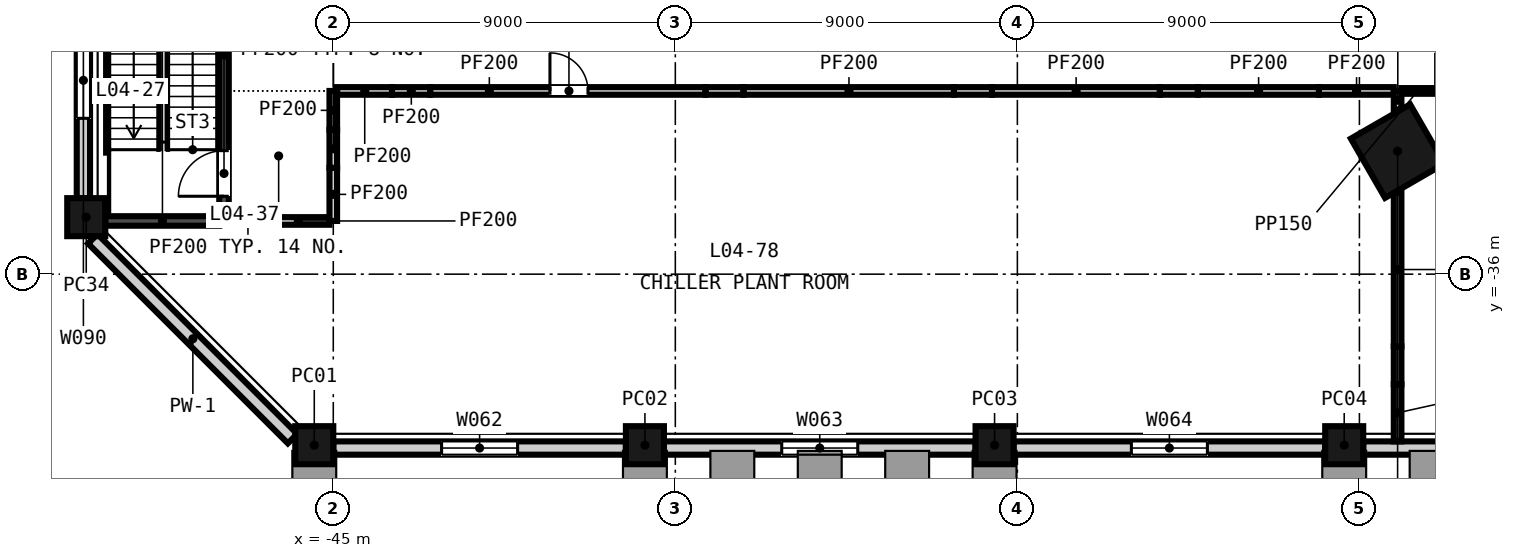
"""IFC4 building model, lengths in metres.
Left out: names, types, materials, properties, quantities, classifications, styles, units other than length and angle.
Written with IfcOpenShell. Run it as: python <this file> out.ifc"""

import sys

from ifc_helpers import new_model, si_unit, direction, frame, frame_2d, origin, origin_2d, place, context, subcontext, project, spatial, rectangle, extrude, element, fill, save


model = new_model("IFC4")
c1 = context("Model", 3, precision=1e-05, world=origin(), true_north=direction((0.0, 1.0)))
c2 = subcontext(c1, "Body", "Model", "MODEL_VIEW")
j1 = project(units=[si_unit("LENGTHUNIT", "METRE"), si_unit("PLANEANGLEUNIT", "RADIAN")], contexts=[c1])
p1 = place(None, origin())
s1 = spatial("IfcSite", under=j1, at=p1, CompositionType="ELEMENT")
p2 = place(p1, origin())
s2 = spatial("IfcBuilding", under=s1, at=p2, CompositionType="ELEMENT")
p3 = place(p2, frame((0.0, 0.0, 27.0)))
s3 = spatial("IfcBuildingStorey", under=s2, at=p3, CompositionType="ELEMENT", Elevation=27.0)
p4 = place(p3, frame((-16.995, -32.763, -0.3), z_axis=(0.0, 0.0, 1.0), x_axis=(0.5, -0.866025403784, 0.0)))
e1 = element("IfcColumn", 1, at=p4, inside=s3, PredefinedType="COLUMN", context=c2, shape_type="SweptSolid", body=[
    extrude(rectangle(XDim=1.8, YDim=1.8, at=origin_2d()), origin(), (0.0, 0.0, 1.0), 4.5),
])
for number, where, z_axis, x_axis in (
    (2, (-45.5, -40.5, -0.3), (0.0, 0.0, 1.0), (1.0, 0.0, 0.0)),
    (3, (-36.8, -40.5, -0.3), (0.0, 0.0, 1.0), (1.0, 0.0, 0.0)),
    (4, (-27.6, -40.5, -0.3), (0.0, 0.0, 1.0), (1.0, 0.0, 0.0)),
    (5, (-18.4, -40.5, -0.3), (0.0, 0.0, 1.0), (1.0, 0.0, 0.0)),
    (6, (-51.5, -34.5, -0.3), (0.0, 0.0, 1.0), (0.0, -1.0, 0.0)),
):
    element("IfcColumn", number, at=place(p3, frame(where, z_axis=z_axis, x_axis=x_axis)), inside=s3, PredefinedType="COLUMN", context=c2, shape_type="SweptSolid", body=[
        extrude(rectangle(XDim=1.0, YDim=1.0, at=origin_2d()), origin(), (0.0, 0.0, 1.0), 4.5),
    ])
p5 = place(p3, frame((-45.0, -40.575, -0.3), z_axis=(0.0, 0.0, 1.0), x_axis=(1.0, 0.0, 0.0)))
e7 = element("IfcWall", 7, at=p5, inside=s3, PredefinedType="SOLIDWALL", context=c2, shape_type="SweptSolid", body=[
    extrude(rectangle(XDim=7.7, YDim=0.35, at=frame_2d((3.85, 0.0))), origin(), (0.0, 0.0, 1.0), 3.6),
])
p6 = place(p5, frame((2.85, 0.0, 1.2)))
e8 = element("IfcOpeningElement", 8, at=p6, cuts=e7, PredefinedType="OPENING", context=c2, shape_type="SweptSolid", body=[
    extrude(rectangle(XDim=2.0, YDim=2.35, at=frame_2d((1.0, 1.175))), frame((0.0, 0.185, 0.0), z_axis=(0.0, -1.0, 0.0), x_axis=(1.0, 0.0, 0.0)), (0.0, 0.0, 1.0), 0.37),
])
p7 = place(p3, frame((-36.3, -40.575, -0.3), z_axis=(0.0, 0.0, 1.0), x_axis=(1.0, 0.0, 0.0)))
e9 = element("IfcWall", 9, at=p7, inside=s3, PredefinedType="SOLIDWALL", context=c2, shape_type="SweptSolid", body=[
    extrude(rectangle(XDim=8.2, YDim=0.35, at=frame_2d((4.1, 0.0))), origin(), (0.0, 0.0, 1.0), 3.6),
])
p8 = place(p7, frame((3.1, 0.0, 1.2)))
e10 = element("IfcOpeningElement", 10, at=p8, cuts=e9, PredefinedType="OPENING", context=c2, shape_type="SweptSolid", body=[
    extrude(rectangle(XDim=2.0, YDim=2.35, at=frame_2d((1.0, 1.175))), frame((0.0, 0.185, 0.0), z_axis=(0.0, -1.0, 0.0), x_axis=(1.0, 0.0, 0.0)), (0.0, 0.0, 1.0), 0.37),
])
p9 = place(p3, frame((-27.1, -40.575, -0.3), z_axis=(0.0, 0.0, 1.0), x_axis=(1.0, 0.0, 0.0)))
e11 = element("IfcWall", 11, at=p9, inside=s3, PredefinedType="SOLIDWALL", context=c2, shape_type="SweptSolid", body=[
    extrude(rectangle(XDim=8.2, YDim=0.35, at=frame_2d((4.1, 0.0))), origin(), (0.0, 0.0, 1.0), 3.6),
])
p10 = place(p9, frame((3.1, 0.0, 1.2)))
e12 = element("IfcOpeningElement", 12, at=p10, cuts=e11, PredefinedType="OPENING", context=c2, shape_type="SweptSolid", body=[
    extrude(rectangle(XDim=2.0, YDim=2.35, at=frame_2d((1.0, 1.175))), frame((0.0, 0.185, 0.0), z_axis=(0.0, -1.0, 0.0), x_axis=(1.0, 0.0, 0.0)), (0.0, 0.0, 1.0), 0.37),
])
p11 = place(p3, frame((-17.9, -40.575, -0.3), z_axis=(0.0, 0.0, 1.0), x_axis=(1.0, 0.0, 0.0)))
e13 = element("IfcWall", 13, at=p11, inside=s3, PredefinedType="SOLIDWALL", context=c2, shape_type="SweptSolid", body=[
    extrude(rectangle(XDim=8.2, YDim=0.35, at=frame_2d((4.1, 0.0))), origin(), (0.0, 0.0, 1.0), 3.6),
])
p12 = place(p11, frame((3.1, 0.0, 1.2)))
e14 = element("IfcOpeningElement", 14, at=p12, cuts=e13, PredefinedType="OPENING", context=c2, shape_type="SweptSolid", body=[
    extrude(rectangle(XDim=2.0, YDim=2.35, at=frame_2d((1.0, 1.175))), frame((0.0, 0.185, 0.0), z_axis=(0.0, -1.0, 0.0), x_axis=(1.0, 0.0, 0.0)), (0.0, 0.0, 1.0), 0.37),
])
p13 = place(p3, frame((-51.575, -27.8, -0.3), z_axis=(0.0, 0.0, 1.0), x_axis=(0.0, -1.0, 0.0)))
e15 = element("IfcWall", 15, at=p13, inside=s3, PredefinedType="SOLIDWALL", context=c2, shape_type="SweptSolid", body=[
    extrude(rectangle(XDim=6.2, YDim=0.35, at=frame_2d((3.1, 0.0))), origin(), (0.0, 0.0, 1.0), 3.6),
])
p14 = place(p13, frame((2.1, 0.0, 1.2)))
e16 = element("IfcOpeningElement", 16, at=p14, cuts=e15, PredefinedType="OPENING", context=c2, shape_type="SweptSolid", body=[
    extrude(rectangle(XDim=2.0, YDim=2.35, at=frame_2d((1.0, 1.175))), frame((0.0, 0.185, 0.0), z_axis=(0.0, -1.0, 0.0), x_axis=(1.0, 0.0, 0.0)), (0.0, 0.0, 1.0), 0.37),
])
p15 = place(p3, frame((-51.327, -35.072, -0.3), z_axis=(0.0, 0.0, 1.0), x_axis=(0.707106781187, -0.707106781187, 0.0)))
e17 = element("IfcWall", 17, at=p15, inside=s3, PredefinedType="SOLIDWALL", context=c2, shape_type="SweptSolid", body=[
    extrude(rectangle(XDim=7.433, YDim=0.35, at=frame_2d((3.716, 0.0))), origin(), (0.0, 0.0, 1.0), 3.6),
])
p16 = place(p3, frame((-51.0, -34.6, 0.0), z_axis=(0.0, 0.0, 1.0), x_axis=(1.0, 0.0, 0.0)))
e18 = element("IfcWall", 18, at=p16, inside=s3, PredefinedType="SHEAR", context=c2, shape_type="SweptSolid", body=[
    extrude(rectangle(XDim=3.0, YDim=0.25, at=frame_2d((1.5, 0.0))), origin(), (0.0, 0.0, 1.0), 4.2),
])
p17 = place(p3, frame((-47.75, -34.6, 0.0), z_axis=(0.0, 0.0, 1.0), x_axis=(1.0, 0.0, 0.0)))
e19 = element("IfcWall", 19, at=p17, inside=s3, PredefinedType="PARTITIONING", context=c2, shape_type="SweptSolid", body=[
    extrude(rectangle(XDim=1.0, YDim=0.2, at=frame_2d((0.5, 0.0))), origin(), (0.0, 0.0, 1.0), 3.111),
])
p18 = place(p3, frame((-46.75, -34.6, 0.0), z_axis=(0.0, 0.0, 1.0), x_axis=(1.0, 0.0, 0.0)))
e20 = element("IfcWall", 20, at=p18, inside=s3, PredefinedType="PARTITIONING", context=c2, shape_type="SweptSolid", body=[
    extrude(rectangle(XDim=1.65, YDim=0.2, at=frame_2d((0.825, 0.0))), origin(), (0.0, 0.0, 1.0), 4.2),
])
p19 = place(p3, frame((-44.9, -31.179, 0.0), z_axis=(0.0, 0.0, 1.0), x_axis=(1.0, 0.0, 0.0)))
e21 = element("IfcWall", 21, at=p19, inside=s3, PredefinedType="PARTITIONING", context=c2, shape_type="SweptSolid", body=[
    extrude(rectangle(XDim=1.445, YDim=0.2, at=frame_2d((0.723, 0.0))), origin(), (0.0, 0.0, 1.0), 4.2),
])
p20 = place(p3, frame((-43.455, -31.179, 0.0), z_axis=(0.0, 0.0, 1.0), x_axis=(1.0, 0.0, 0.0)))
e22 = element("IfcWall", 22, at=p20, inside=s3, PredefinedType="PARTITIONING", context=c2, shape_type="SweptSolid", body=[
    extrude(rectangle(XDim=1.006, YDim=0.2, at=frame_2d((0.503, 0.0))), origin(), (0.0, 0.0, 1.0), 3.111),
])
p21 = place(p3, frame((-42.449, -31.179, 0.0), z_axis=(0.0, 0.0, 1.0), x_axis=(1.0, 0.0, 0.0)))
e23 = element("IfcWall", 23, at=p21, inside=s3, PredefinedType="PARTITIONING", context=c2, shape_type="SweptSolid", body=[
    extrude(rectangle(XDim=7.245, YDim=0.2, at=frame_2d((3.623, 0.0))), origin(), (0.0, 0.0, 1.0), 4.2),
])
p22 = place(p21, frame((3.15, 0.0, 0.0)))
e24 = element("IfcOpeningElement", 24, at=p22, cuts=e23, PredefinedType="OPENING", context=c2, shape_type="SweptSolid", body=[
    extrude(rectangle(XDim=1.0, YDim=2.1, at=frame_2d((0.5, 1.05))), frame((0.0, 0.11, 0.0), z_axis=(0.0, -1.0, 0.0), x_axis=(1.0, 0.0, 0.0)), (0.0, 0.0, 1.0), 0.22),
])
p23 = place(p3, frame((-35.204, -31.179, 0.0), z_axis=(0.0, 0.0, 1.0), x_axis=(1.0, 0.0, 0.0)))
e25 = element("IfcWall", 25, at=p23, inside=s3, PredefinedType="PARTITIONING", context=c2, shape_type="SweptSolid", body=[
    extrude(rectangle(XDim=1.0, YDim=0.2, at=frame_2d((0.5, 0.0))), origin(), (0.0, 0.0, 1.0), 3.111),
])
p24 = place(p3, frame((-34.204, -31.179, 0.0), z_axis=(0.0, 0.0, 1.0), x_axis=(1.0, 0.0, 0.0)))
e26 = element("IfcWall", 26, at=p24, inside=s3, PredefinedType="PARTITIONING", context=c2, shape_type="SweptSolid", body=[
    extrude(rectangle(XDim=5.536, YDim=0.2, at=frame_2d((2.768, 0.0))), origin(), (0.0, 0.0, 1.0), 4.2),
])
p25 = place(p3, frame((-28.668, -31.179, 0.0), z_axis=(0.0, 0.0, 1.0), x_axis=(1.0, 0.0, 0.0)))
e27 = element("IfcWall", 27, at=p25, inside=s3, PredefinedType="PARTITIONING", context=c2, shape_type="SweptSolid", body=[
    extrude(rectangle(XDim=1.0, YDim=0.2, at=frame_2d((0.5, 0.0))), origin(), (0.0, 0.0, 1.0), 3.286),
])
p26 = place(p3, frame((-27.668, -31.179, 0.0), z_axis=(0.0, 0.0, 1.0), x_axis=(1.0, 0.0, 0.0)))
e28 = element("IfcWall", 28, at=p26, inside=s3, PredefinedType="PARTITIONING", context=c2, shape_type="SweptSolid", body=[
    extrude(rectangle(XDim=4.418, YDim=0.2, at=frame_2d((2.209, 0.0))), origin(), (0.0, 0.0, 1.0), 4.2),
])
p27 = place(p3, frame((-23.25, -31.179, 0.0), z_axis=(0.0, 0.0, 1.0), x_axis=(1.0, 0.0, 0.0)))
e29 = element("IfcWall", 29, at=p27, inside=s3, PredefinedType="PARTITIONING", context=c2, shape_type="SweptSolid", body=[
    extrude(rectangle(XDim=1.0, YDim=0.2, at=frame_2d((0.5, 0.0))), origin(), (0.0, 0.0, 1.0), 3.441),
])
p28 = place(p3, frame((-22.25, -31.179, 0.0), z_axis=(0.0, 0.0, 1.0), x_axis=(1.0, 0.0, 0.0)))
e30 = element("IfcWall", 30, at=p28, inside=s3, PredefinedType="PARTITIONING", context=c2, shape_type="SweptSolid", body=[
    extrude(rectangle(XDim=3.185, YDim=0.2, at=frame_2d((1.593, 0.0))), origin(), (0.0, 0.0, 1.0), 4.2),
])
p29 = place(p3, frame((-19.065, -31.179, 0.0), z_axis=(0.0, 0.0, 1.0), x_axis=(1.0, 0.0, 0.0)))
e31 = element("IfcWall", 31, at=p29, inside=s3, PredefinedType="PARTITIONING", context=c2, shape_type="SweptSolid", body=[
    extrude(rectangle(XDim=1.97, YDim=0.2, at=frame_2d((0.985, 0.0))), origin(), (0.0, 0.0, 1.0), 3.2),
])
p30 = place(p3, frame((-16.895, -31.179, 0.0), z_axis=(0.0, 0.0, 1.0), x_axis=(1.0, 0.0, 0.0)))
e32 = element("IfcWall", 32, at=p30, inside=s3, PredefinedType="PARTITIONING", context=c2, shape_type="SweptSolid", body=[
    extrude(rectangle(XDim=2.663, YDim=0.15, at=frame_2d((1.332, 0.0))), origin(), (0.0, 0.0, 1.0), 4.2),
])
p31 = place(p30, frame((0.9, 0.0, 0.0)))
e33 = element("IfcOpeningElement", 33, at=p31, cuts=e32, PredefinedType="OPENING", context=c2, shape_type="SweptSolid", body=[
    extrude(rectangle(XDim=1.0, YDim=2.1, at=frame_2d((0.5, 1.05))), frame((0.0, 0.085, 0.0), z_axis=(0.0, -1.0, 0.0), x_axis=(1.0, 0.0, 0.0)), (0.0, 0.0, 1.0), 0.17),
])
p32 = place(p3, frame((-47.875, -34.6, 0.0), z_axis=(0.0, 0.0, 1.0), x_axis=(0.0, 1.0, 0.0)))
e34 = element("IfcWall", 34, at=p32, inside=s3, PredefinedType="SHEAR", context=c2, shape_type="SweptSolid", body=[
    extrude(rectangle(XDim=6.821, YDim=0.25, at=frame_2d((3.411, 0.0))), origin(), (0.0, 0.0, 1.0), 4.2),
])
p33 = place(p32, frame((0.65, 0.0, 0.0)))
e35 = element("IfcOpeningElement", 35, at=p33, cuts=e34, PredefinedType="OPENING", context=c2, shape_type="SweptSolid", body=[
    extrude(rectangle(XDim=1.2, YDim=2.1, at=frame_2d((0.6, 1.05))), frame((0.0, 0.135, 0.0), z_axis=(0.0, -1.0, 0.0), x_axis=(1.0, 0.0, 0.0)), (0.0, 0.0, 1.0), 0.27),
])
p34 = place(p3, frame((-45.0, -34.6, 0.0), z_axis=(0.0, 0.0, 1.0), x_axis=(0.0, 1.0, 0.0)))
e36 = element("IfcWall", 36, at=p34, inside=s3, PredefinedType="PARTITIONING", context=c2, shape_type="SweptSolid", body=[
    extrude(rectangle(XDim=1.399, YDim=0.2, at=frame_2d((0.7, 0.0))), origin(), (0.0, 0.0, 1.0), 4.2),
])
p35 = place(p3, frame((-45.0, -33.201, 0.0), z_axis=(0.0, 0.0, 1.0), x_axis=(0.0, 1.0, 0.0)))
e37 = element("IfcWall", 37, at=p35, inside=s3, PredefinedType="PARTITIONING", context=c2, shape_type="SweptSolid", body=[
    extrude(rectangle(XDim=1.0, YDim=0.2, at=frame_2d((0.5, 0.0))), origin(), (0.0, 0.0, 1.0), 3.111),
])
p36 = place(p3, frame((-45.0, -32.201, 0.0), z_axis=(0.0, 0.0, 1.0), x_axis=(0.0, 1.0, 0.0)))
e38 = element("IfcWall", 38, at=p36, inside=s3, PredefinedType="PARTITIONING", context=c2, shape_type="SweptSolid", body=[
    extrude(rectangle(XDim=1.022, YDim=0.2, at=frame_2d((0.511, 0.0))), origin(), (0.0, 0.0, 1.0), 4.2),
])
p37 = place(p3, frame((-16.995, -40.4, 0.0), z_axis=(0.0, 0.0, 1.0), x_axis=(0.0, 1.0, 0.0)))
e39 = element("IfcWall", 39, at=p37, inside=s3, PredefinedType="PARTITIONING", context=c2, shape_type="SweptSolid", body=[
    extrude(rectangle(XDim=1.504, YDim=0.2, at=frame_2d((0.752, 0.0))), origin(), (0.0, 0.0, 1.0), 4.2),
])
p38 = place(p3, frame((-16.995, -38.896, 0.0), z_axis=(0.0, 0.0, 1.0), x_axis=(0.0, 1.0, 0.0)))
e40 = element("IfcWall", 40, at=p38, inside=s3, PredefinedType="PARTITIONING", context=c2, shape_type="SweptSolid", body=[
    extrude(rectangle(XDim=1.0, YDim=0.2, at=frame_2d((0.5, 0.0))), origin(), (0.0, 0.0, 1.0), 3.676),
])
p39 = place(p3, frame((-16.995, -37.896, 0.0), z_axis=(0.0, 0.0, 1.0), x_axis=(0.0, 1.0, 0.0)))
e41 = element("IfcWall", 41, at=p39, inside=s3, PredefinedType="PARTITIONING", context=c2, shape_type="SweptSolid", body=[
    extrude(rectangle(XDim=4.036, YDim=0.2, at=frame_2d((2.018, 0.0))), origin(), (0.0, 0.0, 1.0), 4.2),
])
p40 = place(p3, frame((-16.995, -31.666, 0.0), z_axis=(0.0, 0.0, 1.0), x_axis=(0.0, 1.0, 0.0)))
e42 = element("IfcWall", 42, at=p40, inside=s3, PredefinedType="PARTITIONING", context=c2, shape_type="SweptSolid", body=[
    extrude(rectangle(XDim=0.487, YDim=0.2, at=frame_2d((0.244, 0.0))), origin(), (0.0, 0.0, 1.0), 4.2),
])
p41 = place(p6, origin())
e43 = element("IfcWindow", 43, at=p41, inside=s3, PartitioningType="SINGLE_PANEL", PredefinedType="WINDOW", context=c2, shape_type="SweptSolid", body=[
    extrude(rectangle(XDim=2.0, YDim=2.35, at=frame_2d((1.0, 1.175))), frame((0.0, 0.03, 0.0), z_axis=(0.0, -1.0, 0.0), x_axis=(1.0, 0.0, 0.0)), (0.0, 0.0, 1.0), 0.06),
])
fill(e8, e43)
p42 = place(p8, origin())
e44 = element("IfcWindow", 44, at=p42, inside=s3, PartitioningType="SINGLE_PANEL", PredefinedType="WINDOW", context=c2, shape_type="SweptSolid", body=[
    extrude(rectangle(XDim=2.0, YDim=2.35, at=frame_2d((1.0, 1.175))), frame((0.0, 0.03, 0.0), z_axis=(0.0, -1.0, 0.0), x_axis=(1.0, 0.0, 0.0)), (0.0, 0.0, 1.0), 0.06),
])
fill(e10, e44)
p43 = place(p10, origin())
e45 = element("IfcWindow", 45, at=p43, inside=s3, PartitioningType="SINGLE_PANEL", PredefinedType="WINDOW", context=c2, shape_type="SweptSolid", body=[
    extrude(rectangle(XDim=2.0, YDim=2.35, at=frame_2d((1.0, 1.175))), frame((0.0, 0.03, 0.0), z_axis=(0.0, -1.0, 0.0), x_axis=(1.0, 0.0, 0.0)), (0.0, 0.0, 1.0), 0.06),
])
fill(e12, e45)
p44 = place(p14, origin())
e46 = element("IfcWindow", 46, at=p44, inside=s3, PartitioningType="SINGLE_PANEL", PredefinedType="WINDOW", context=c2, shape_type="SweptSolid", body=[
    extrude(rectangle(XDim=2.0, YDim=2.35, at=frame_2d((1.0, 1.175))), frame((0.0, 0.03, 0.0), z_axis=(0.0, -1.0, 0.0), x_axis=(1.0, 0.0, 0.0)), (0.0, 0.0, 1.0), 0.06),
])
fill(e16, e46)
p45 = place(p33, origin())
e47 = element("IfcDoor", 47, at=p45, inside=s3, OperationType="SINGLE_SWING_LEFT", PredefinedType="DOOR", context=c2, shape_type="SweptSolid", body=[
    extrude(rectangle(XDim=1.2, YDim=2.1, at=frame_2d((0.6, 1.05))), frame((0.0, 0.025, 0.0), z_axis=(0.0, -1.0, 0.0), x_axis=(1.0, 0.0, 0.0)), (0.0, 0.0, 1.0), 0.05),
])
fill(e35, e47)
p46 = place(p22, origin())
e48 = element("IfcDoor", 48, at=p46, inside=s3, OperationType="SINGLE_SWING_LEFT", PredefinedType="DOOR", context=c2, shape_type="SweptSolid", body=[
    extrude(rectangle(XDim=1.0, YDim=2.1, at=frame_2d((0.5, 1.05))), frame((0.0, 0.025, 0.0), z_axis=(0.0, -1.0, 0.0), x_axis=(1.0, 0.0, 0.0)), (0.0, 0.0, 1.0), 0.05),
])
fill(e24, e48)
save(model, sys.argv[1])
